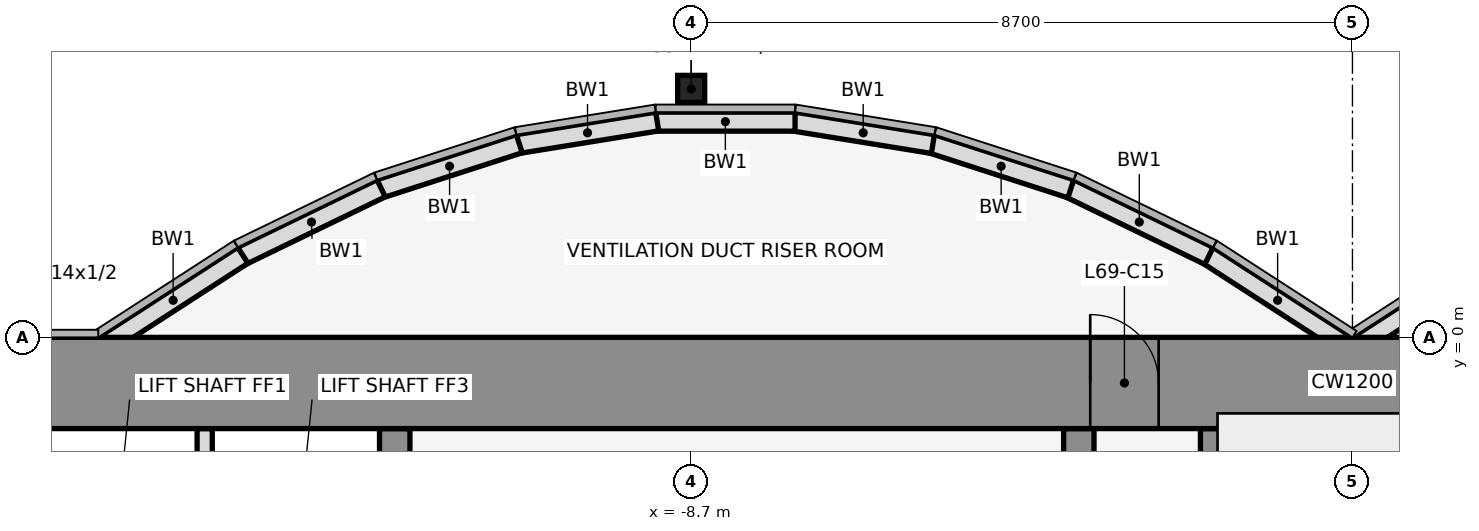
"""IFC4 building model, lengths in metres.
Left out: names, types, materials, properties, quantities, classifications, styles, units other than length and angle.
Written with IfcOpenShell. Run it as: python <this file> out.ifc"""

import sys

from ifc_helpers import new_model, si_unit, direction, frame, frame_2d, origin, origin_2d, place, context, subcontext, project, spatial, rectangle, hollow_rectangle, extrude, element, fill, save


model = new_model("IFC4")
c1 = context("Model", 3, precision=1e-05, world=origin(), true_north=direction((0.0, 1.0)))
c2 = subcontext(c1, "Body", "Model", "MODEL_VIEW")
j1 = project(units=[si_unit("LENGTHUNIT", "METRE"), si_unit("PLANEANGLEUNIT", "RADIAN")], contexts=[c1])
p1 = place(None, origin())
s1 = spatial("IfcSite", under=j1, at=p1, CompositionType="ELEMENT")
p2 = place(p1, origin())
s2 = spatial("IfcBuilding", under=s1, at=p2, CompositionType="ELEMENT")
p3 = place(p2, frame((0.0, 0.0, 306.5)))
s3 = spatial("IfcBuildingStorey", under=s2, at=p3, CompositionType="ELEMENT", Elevation=306.5)
p4 = place(p3, frame((-8.7, 3.269, 0.0), z_axis=(0.0, 0.0, 1.0), x_axis=(1.0, 0.0, 0.0)))
e1 = element("IfcColumn", 1, at=p4, inside=s3, PredefinedType="COLUMN", context=c2, shape_type="SweptSolid", body=[
    extrude(hollow_rectangle(XDim=0.356, YDim=0.356, WallThickness=0.012, at=origin_2d()), origin(), (0.0, 0.0, 1.0), 4.5),
])
for number, where, z_axis, x_axis in (
    (2, (1.901, 1.08, 0.0), (0.0, 0.0, 1.0), (-0.84, -0.543, 0.0)),
    (3, (-0.068, -0.105, 0.0), (0.0, 0.0, 1.0), (-0.84, 0.543, 0.0)),
):
    element("IfcWall", number, at=place(p3, frame(where, z_axis=z_axis, x_axis=x_axis)), inside=s3, PredefinedType="STANDARD", context=c2, shape_type="SweptSolid", body=[
        extrude(rectangle(XDim=2.183, YDim=0.25, at=frame_2d((1.091, 0.0))), origin(), (0.0, 0.0, 1.0), 4.35),
    ])
p5 = place(p3, frame((-1.888, 1.073, 0.0), z_axis=(0.0, 0.0, 1.0), x_axis=(-0.89982408427, 0.436252928206, 0.0)))
e4 = element("IfcWall", 4, at=p5, inside=s3, PredefinedType="STANDARD", context=c2, shape_type="SweptSolid", body=[
    extrude(rectangle(XDim=2.038, YDim=0.25, at=frame_2d((1.019, 0.0))), origin(), (0.0, 0.0, 1.0), 4.35),
])
p6 = place(p3, frame((-3.705, 1.955, 0.0), z_axis=(0.0, 0.0, 1.0), x_axis=(-0.951495806175, 0.307661714928, 0.0)))
e5 = element("IfcWall", 5, at=p6, inside=s3, PredefinedType="STANDARD", context=c2, shape_type="SweptSolid", body=[
    extrude(rectangle(XDim=1.927, YDim=0.25, at=frame_2d((0.963, 0.0))), origin(), (0.0, 0.0, 1.0), 4.35),
])
p7 = place(p3, frame((-5.52, 2.543, 0.0), z_axis=(0.0, 0.0, 1.0), x_axis=(-0.987181718931, 0.159600293885, 0.0)))
e6 = element("IfcWall", 6, at=p7, inside=s3, PredefinedType="STANDARD", context=c2, shape_type="SweptSolid", body=[
    extrude(rectangle(XDim=1.857, YDim=0.25, at=frame_2d((0.929, 0.0))), origin(), (0.0, 0.0, 1.0), 4.35),
])
p8 = place(p3, frame((-7.333, 2.838, 0.0), z_axis=(0.0, 0.0, 1.0), x_axis=(-1.0, 0.0, 0.0)))
e7 = element("IfcWall", 7, at=p8, inside=s3, PredefinedType="STANDARD", context=c2, shape_type="SweptSolid", body=[
    extrude(rectangle(XDim=1.833, YDim=0.25, at=frame_2d((0.917, 0.0))), origin(), (0.0, 0.0, 1.0), 4.35),
])
p9 = place(p3, frame((-9.147, 2.84, 0.0), z_axis=(0.0, 0.0, 1.0), x_axis=(-0.987181718931, -0.159600293885, 0.0)))
e8 = element("IfcWall", 8, at=p9, inside=s3, PredefinedType="STANDARD", context=c2, shape_type="SweptSolid", body=[
    extrude(rectangle(XDim=1.857, YDim=0.25, at=frame_2d((0.929, 0.0))), origin(), (0.0, 0.0, 1.0), 4.35),
])
p10 = place(p3, frame((-10.962, 2.548, 0.0), z_axis=(0.0, 0.0, 1.0), x_axis=(-0.951495806175, -0.307661714928, 0.0)))
e9 = element("IfcWall", 9, at=p10, inside=s3, PredefinedType="STANDARD", context=c2, shape_type="SweptSolid", body=[
    extrude(rectangle(XDim=1.927, YDim=0.25, at=frame_2d((0.963, 0.0))), origin(), (0.0, 0.0, 1.0), 4.35),
])
p11 = place(p3, frame((-12.779, 1.962, 0.0), z_axis=(0.0, 0.0, 1.0), x_axis=(-0.89982408427, -0.436252928206, 0.0)))
e10 = element("IfcWall", 10, at=p11, inside=s3, PredefinedType="STANDARD", context=c2, shape_type="SweptSolid", body=[
    extrude(rectangle(XDim=2.038, YDim=0.25, at=frame_2d((1.019, 0.0))), origin(), (0.0, 0.0, 1.0), 4.35),
])
p12 = place(p3, frame((-14.599, 1.08, 0.0), z_axis=(0.0, 0.0, 1.0), x_axis=(-0.83981312244, -0.542875602121, 0.0)))
e11 = element("IfcWall", 11, at=p12, inside=s3, PredefinedType="STANDARD", context=c2, shape_type="SweptSolid", body=[
    extrude(rectangle(XDim=2.183, YDim=0.25, at=frame_2d((1.091, 0.0))), origin(), (0.0, 0.0, 1.0), 4.35),
])
p13 = place(p3, frame((-15.1, -4.6, 0.0), z_axis=(0.0, 0.0, 1.0), x_axis=(0.0, 1.0, 0.0)))
e12 = element("IfcWall", 12, at=p13, inside=s3, PredefinedType="PARTITIONING", context=c2, shape_type="SweptSolid", body=[
    extrude(rectangle(XDim=3.4, YDim=0.2, at=frame_2d((1.7, 0.0))), origin(), (0.0, 0.0, 1.0), 3.418),
])
p14 = place(p3, frame((-12.6, -11.8, 0.0), z_axis=(0.0, 0.0, 1.0), x_axis=(0.0, 1.0, 0.0)))
e13 = element("IfcWall", 13, at=p14, inside=s3, PredefinedType="SHEAR", context=c2, shape_type="SweptSolid", body=[
    extrude(rectangle(XDim=10.6, YDim=0.4, at=frame_2d((5.3, 0.0))), origin(), (0.0, 0.0, 1.0), 4.5),
])
p15 = place(p14, frame((4.75, 0.0, 0.0)))
e14 = element("IfcOpeningElement", 14, at=p15, cuts=e13, PredefinedType="OPENING", context=c2, shape_type="SweptSolid", body=[
    extrude(rectangle(XDim=1.1, YDim=2.1, at=frame_2d((0.55, 1.05))), frame((0.0, 0.212, 0.0), z_axis=(0.0, -1.0, 0.0), x_axis=(1.0, 0.0, 0.0)), (0.0, 0.0, 1.0), 0.424),
])
p16 = place(p3, frame((-3.6, -11.8, 0.0), z_axis=(0.0, 0.0, 1.0), x_axis=(0.0, 1.0, 0.0)))
e15 = element("IfcWall", 15, at=p16, inside=s3, PredefinedType="SHEAR", context=c2, shape_type="SweptSolid", body=[
    extrude(rectangle(XDim=10.6, YDim=0.4, at=frame_2d((5.3, 0.0))), origin(), (0.0, 0.0, 1.0), 4.5),
])
p17 = place(p16, frame((4.85, 0.0, 0.0)))
e16 = element("IfcOpeningElement", 16, at=p17, cuts=e15, PredefinedType="OPENING", context=c2, shape_type="SweptSolid", body=[
    extrude(rectangle(XDim=0.9, YDim=2.1, at=frame_2d((0.45, 1.05))), frame((0.0, 0.212, 0.0), z_axis=(0.0, -1.0, 0.0), x_axis=(1.0, 0.0, 0.0)), (0.0, 0.0, 1.0), 0.424),
])
p18 = place(p3, frame((-1.8, -11.8, 0.0), z_axis=(0.0, 0.0, 1.0), x_axis=(0.0, 1.0, 0.0)))
e17 = element("IfcWall", 17, at=p18, inside=s3, PredefinedType="SHEAR", context=c2, shape_type="SweptSolid", body=[
    extrude(rectangle(XDim=10.6, YDim=0.4, at=frame_2d((5.3, 0.0))), origin(), (0.0, 0.0, 1.0), 4.5),
])
p19 = place(p3, frame((-22.0, -0.6, 0.0), z_axis=(0.0, 0.0, 1.0), x_axis=(1.0, 0.0, 0.0)))
e18 = element("IfcWall", 18, at=p19, inside=s3, PredefinedType="SHEAR", context=c2, shape_type="SweptSolid", body=[
    extrude(rectangle(XDim=44.0, YDim=1.2, at=frame_2d((22.0, 0.0))), origin(), (0.0, 0.0, 1.0), 4.5),
])
p20 = place(p19, frame((18.55, 0.0, 0.0)))
e19 = element("IfcOpeningElement", 19, at=p20, cuts=e18, PredefinedType="OPENING", context=c2, shape_type="SweptSolid", body=[
    extrude(rectangle(XDim=0.9, YDim=2.1, at=frame_2d((0.45, 1.05))), frame((0.0, 0.612, 0.0), z_axis=(0.0, -1.0, 0.0), x_axis=(1.0, 0.0, 0.0)), (0.0, 0.0, 1.0), 1.224),
])
p21 = place(p19, frame((24.55, 0.0, 0.0)))
e20 = element("IfcOpeningElement", 20, at=p21, cuts=e18, PredefinedType="OPENING", context=c2, shape_type="SweptSolid", body=[
    extrude(rectangle(XDim=0.9, YDim=2.1, at=frame_2d((0.45, 1.05))), frame((0.0, 0.612, 0.0), z_axis=(0.0, -1.0, 0.0), x_axis=(1.0, 0.0, 0.0)), (0.0, 0.0, 1.0), 1.224),
])
p22 = place(p20, origin())
e21 = element("IfcDoor", 21, at=p22, inside=s3, OperationType="SINGLE_SWING_LEFT", PredefinedType="DOOR", context=c2, shape_type="SweptSolid", body=[
    extrude(rectangle(XDim=0.9, YDim=2.1, at=frame_2d((0.45, 1.05))), frame((0.0, 0.025, 0.0), z_axis=(0.0, -1.0, 0.0), x_axis=(1.0, 0.0, 0.0)), (0.0, 0.0, 1.0), 0.05),
])
fill(e19, e21)
save(model, sys.argv[1])
